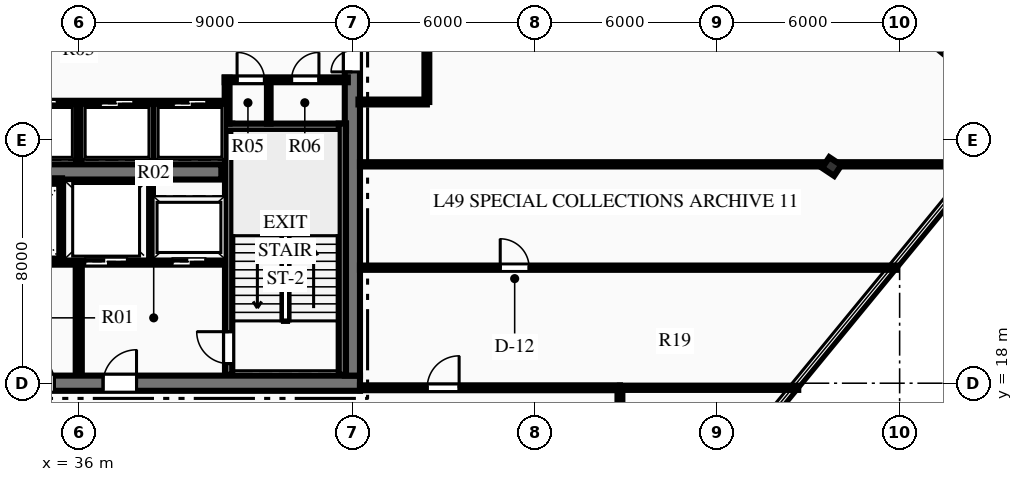
"""IFC4 building model, lengths in metres.
Left out: names, types, materials, properties, quantities, classifications, styles, units other than length and angle.
Written with IfcOpenShell. Run it as: python <this file> out.ifc"""

import sys

from ifc_helpers import new_model, si_unit, direction, frame, frame_2d, origin, origin_2d, place, context, subcontext, project, spatial, rectangle, i_section, extrude, element, fill, save


model = new_model("IFC4")
c1 = context("Model", 3, precision=1e-05, world=origin(), true_north=direction((0.0, 1.0)))
c2 = subcontext(c1, "Body", "Model", "MODEL_VIEW")
j1 = project(units=[si_unit("LENGTHUNIT", "METRE"), si_unit("PLANEANGLEUNIT", "RADIAN")], contexts=[c1])
p1 = place(None, origin())
s1 = spatial("IfcSite", under=j1, at=p1, CompositionType="ELEMENT")
p2 = place(p1, origin())
s2 = spatial("IfcBuilding", under=s1, at=p2, CompositionType="ELEMENT")
p3 = place(p2, frame((0.0, 0.0, 198.45)))
s3 = spatial("IfcBuildingStorey", under=s2, at=p3, CompositionType="ELEMENT", Elevation=198.45)
p4 = place(p3, frame((26.75, 18.0, 0.0), z_axis=(0.0, 0.0, 1.0), x_axis=(1.0, 0.0, 0.0)))
e1 = element("IfcWall", 1, at=p4, inside=s3, PredefinedType="SHEAR", context=c2, shape_type="SweptSolid", body=[
    extrude(rectangle(XDim=18.5, YDim=0.5, at=frame_2d((9.25, 0.0))), origin(), (0.0, 0.0, 1.0), 3.75),
])
p5 = place(p4, frame((7.35, 0.0, 0.0)))
e2 = element("IfcOpeningElement", 2, at=p5, cuts=e1, PredefinedType="OPENING", context=c2, shape_type="SweptSolid", body=[
    extrude(rectangle(XDim=1.1, YDim=2.15, at=frame_2d((0.55, 1.075))), frame((0.0, 0.26, 0.0), z_axis=(0.0, -1.0, 0.0), x_axis=(1.0, 0.0, 0.0)), (0.0, 0.0, 1.0), 0.52),
])
p6 = place(p4, frame((10.05, 0.0, 0.0)))
e3 = element("IfcOpeningElement", 3, at=p6, cuts=e1, PredefinedType="OPENING", context=c2, shape_type="SweptSolid", body=[
    extrude(rectangle(XDim=1.1, YDim=2.15, at=frame_2d((0.55, 1.075))), frame((0.0, 0.26, 0.0), z_axis=(0.0, -1.0, 0.0), x_axis=(1.0, 0.0, 0.0)), (0.0, 0.0, 1.0), 0.52),
])
p7 = place(p3, frame((45.0, 18.25, 0.0), z_axis=(0.0, 0.0, 1.0), x_axis=(0.0, 1.0, 0.0)))
e4 = element("IfcWall", 4, at=p7, inside=s3, PredefinedType="SHEAR", context=c2, shape_type="SweptSolid", body=[
    extrude(rectangle(XDim=15.5, YDim=0.5, at=frame_2d((7.75, 0.0))), origin(), (0.0, 0.0, 1.0), 3.75),
])
p8 = place(p7, frame((9.99, 0.0, 0.0)))
e5 = element("IfcOpeningElement", 5, at=p8, cuts=e4, PredefinedType="OPENING", context=c2, shape_type="SweptSolid", body=[
    extrude(rectangle(XDim=1.4, YDim=2.2, at=frame_2d((0.7, 1.1))), frame((0.0, 0.26, 0.0), z_axis=(0.0, -1.0, 0.0), x_axis=(1.0, 0.0, 0.0)), (0.0, 0.0, 1.0), 0.52),
])
p9 = place(p3, frame((31.31, 24.95, 0.0), z_axis=(0.0, 0.0, 1.0), x_axis=(1.0, 0.0, 0.0)))
e6 = element("IfcWall", 6, at=p9, inside=s3, PredefinedType="SHEAR", context=c2, shape_type="SweptSolid", body=[
    extrude(rectangle(XDim=9.38, YDim=0.5, at=frame_2d((4.69, 0.0))), origin(), (0.0, 0.0, 1.0), 3.75),
])
p10 = place(p3, frame((40.93, 18.28, 0.0), z_axis=(0.0, 0.0, 1.0), x_axis=(0.0, 1.0, 0.0)))
e7 = element("IfcWall", 7, at=p10, inside=s3, PredefinedType="SHEAR", context=c2, shape_type="SweptSolid", body=[
    extrude(rectangle(XDim=8.26, YDim=0.24, at=frame_2d((4.13, 0.0))), origin(), (0.0, 0.0, 1.0), 3.75),
])
p11 = place(p10, frame((0.365, 0.0, 0.0)))
e8 = element("IfcOpeningElement", 8, at=p11, cuts=e7, PredefinedType="OPENING", context=c2, shape_type="SweptSolid", body=[
    extrude(rectangle(XDim=1.05, YDim=2.15, at=frame_2d((0.525, 1.075))), frame((0.0, 0.13, 0.0), z_axis=(0.0, -1.0, 0.0), x_axis=(1.0, 0.0, 0.0)), (0.0, 0.0, 1.0), 0.26),
])
p12 = place(p3, frame((40.81, 26.42, 0.0), z_axis=(0.0, 0.0, 1.0), x_axis=(1.0, 0.0, 0.0)))
e9 = element("IfcWall", 9, at=p12, inside=s3, PredefinedType="SHEAR", context=c2, shape_type="SweptSolid", body=[
    extrude(rectangle(XDim=3.98, YDim=0.24, at=frame_2d((1.99, 0.0))), origin(), (0.0, 0.0, 1.0), 3.75),
])
p13 = place(p3, frame((44.67, 18.28, 0.0), z_axis=(0.0, 0.0, 1.0), x_axis=(0.0, 1.0, 0.0)))
e10 = element("IfcWall", 10, at=p13, inside=s3, PredefinedType="SHEAR", context=c2, shape_type="SweptSolid", body=[
    extrude(rectangle(XDim=8.26, YDim=0.24, at=frame_2d((4.13, 0.0))), origin(), (0.0, 0.0, 1.0), 3.75),
])
p14 = place(p3, frame((60.766, 25.126, 0.0), z_axis=(0.0, 0.0, 1.0), x_axis=(0.554118199338, 0.832437998389, 0.0)))
e11 = element("IfcColumn", 11, at=p14, inside=s3, PredefinedType="COLUMN", context=c2, shape_type="SweptSolid", body=[
    extrude(i_section(OverallWidth=0.424, OverallDepth=0.474, WebThickness=0.048, FlangeThickness=0.077, at=origin_2d()), origin(), (0.0, 0.0, 1.0), 3.75),
])
p15 = place(p3, frame((64.094, 29.323, 0.0), z_axis=(0.0, 0.0, 1.0), x_axis=(0.77274818591, -0.634712723343, 0.0)))
e12 = element("IfcWall", 12, at=p15, inside=s3, PredefinedType="STANDARD", context=c2, shape_type="SweptSolid", body=[
    extrude(rectangle(XDim=3.9, YDim=0.32, at=frame_2d((1.95, 0.0))), origin(), (0.0, 0.0, 1.0), 3.47),
])
p16 = place(p3, frame((36.0, 18.28, 0.0), z_axis=(0.0, 0.0, 1.0), x_axis=(0.0, 1.0, 0.0)))
e13 = element("IfcWall", 13, at=p16, inside=s3, PredefinedType="PARTITIONING", context=c2, shape_type="SweptSolid", body=[
    extrude(rectangle(XDim=3.77, YDim=0.2, at=frame_2d((1.885, 0.0))), origin(), (0.0, 0.0, 1.0), 3.47),
])
p17 = place(p3, frame((31.19, 22.0, 0.0), z_axis=(0.0, 0.0, 1.0), x_axis=(1.0, 0.0, 0.0)))
e14 = element("IfcWall", 14, at=p17, inside=s3, PredefinedType="PARTITIONING", context=c2, shape_type="SweptSolid", body=[
    extrude(rectangle(XDim=4.69, YDim=0.2, at=frame_2d((2.345, 0.0))), origin(), (0.0, 0.0, 1.0), 3.47),
])
p18 = place(p17, frame((2.91, 0.0, 0.0)))
e15 = element("IfcOpeningElement", 15, at=p18, cuts=e14, PredefinedType="OPENING", context=c2, shape_type="SweptSolid", body=[
    extrude(rectangle(XDim=0.9, YDim=2.15, at=frame_2d((0.45, 1.075))), frame((0.0, 0.11, 0.0), z_axis=(0.0, -1.0, 0.0), x_axis=(1.0, 0.0, 0.0)), (0.0, 0.0, 1.0), 0.22),
])
p19 = place(p17, frame((0.635, 0.0, 0.0)))
e16 = element("IfcOpeningElement", 16, at=p19, cuts=e14, PredefinedType="OPENING", context=c2, shape_type="SweptSolid", body=[
    extrude(rectangle(XDim=1.1, YDim=2.15, at=frame_2d((0.55, 1.075))), frame((0.0, 0.11, 0.0), z_axis=(0.0, -1.0, 0.0), x_axis=(1.0, 0.0, 0.0)), (0.0, 0.0, 1.0), 0.22),
])
p20 = place(p3, frame((36.12, 22.0, 0.0), z_axis=(0.0, 0.0, 1.0), x_axis=(1.0, 0.0, 0.0)))
e17 = element("IfcWall", 17, at=p20, inside=s3, PredefinedType="PARTITIONING", context=c2, shape_type="SweptSolid", body=[
    extrude(rectangle(XDim=4.69, YDim=0.2, at=frame_2d((2.345, 0.0))), origin(), (0.0, 0.0, 1.0), 3.47),
])
p21 = place(p20, frame((2.955, 0.0, 0.0)))
e18 = element("IfcOpeningElement", 18, at=p21, cuts=e17, PredefinedType="OPENING", context=c2, shape_type="SweptSolid", body=[
    extrude(rectangle(XDim=1.1, YDim=2.15, at=frame_2d((0.55, 1.075))), frame((0.0, 0.11, 0.0), z_axis=(0.0, -1.0, 0.0), x_axis=(1.0, 0.0, 0.0)), (0.0, 0.0, 1.0), 0.22),
])
p22 = place(p20, frame((0.08, 0.0, 0.0)))
e19 = element("IfcOpeningElement", 19, at=p22, cuts=e17, PredefinedType="OPENING", context=c2, shape_type="SweptSolid", body=[
    extrude(rectangle(XDim=1.4, YDim=2.2, at=frame_2d((0.7, 1.1))), frame((0.0, 0.11, 0.0), z_axis=(0.0, -1.0, 0.0), x_axis=(1.0, 0.0, 0.0)), (0.0, 0.0, 1.0), 0.22),
])
p23 = place(p3, frame((35.45, 22.05, 0.0), z_axis=(0.0, 0.0, 1.0), x_axis=(0.0, 1.0, 0.0)))
e20 = element("IfcWall", 20, at=p23, inside=s3, PredefinedType="PARTITIONING", context=c2, shape_type="SweptSolid", body=[
    extrude(rectangle(XDim=2.6, YDim=0.18, at=frame_2d((1.3, 0.0))), origin(), (0.0, 0.0, 1.0), 3.47),
])
p24 = place(p3, frame((33.65, 24.65, 0.0), z_axis=(0.0, 0.0, 1.0), x_axis=(1.0, 0.0, 0.0)))
e21 = element("IfcWall", 21, at=p24, inside=s3, PredefinedType="PARTITIONING", context=c2, shape_type="SweptSolid", body=[
    extrude(rectangle(XDim=1.8, YDim=0.18, at=frame_2d((0.9, 0.0))), origin(), (0.0, 0.0, 1.0), 3.47),
])
p25 = place(p3, frame((38.35, 22.05, 0.0), z_axis=(0.0, 0.0, 1.0), x_axis=(0.0, 1.0, 0.0)))
e22 = element("IfcWall", 22, at=p25, inside=s3, PredefinedType="PARTITIONING", context=c2, shape_type="SweptSolid", body=[
    extrude(rectangle(XDim=2.6, YDim=0.18, at=frame_2d((1.3, 0.0))), origin(), (0.0, 0.0, 1.0), 3.47),
])
p26 = place(p3, frame((40.8, 27.98, 0.0), z_axis=(0.0, 0.0, 1.0), x_axis=(1.0, 0.0, 0.0)))
e23 = element("IfcWall", 23, at=p26, inside=s3, PredefinedType="PARTITIONING", context=c2, shape_type="SweptSolid", body=[
    extrude(rectangle(XDim=4.05, YDim=0.16, at=frame_2d((2.025, 0.0))), origin(), (0.0, 0.0, 1.0), 3.47),
])
p27 = place(p26, frame((0.407, 0.0, 0.0)))
e24 = element("IfcOpeningElement", 24, at=p27, cuts=e23, PredefinedType="OPENING", context=c2, shape_type="SweptSolid", body=[
    extrude(rectangle(XDim=0.9, YDim=2.15, at=frame_2d((0.45, 1.075))), frame((0.0, 0.09, 0.0), z_axis=(0.0, -1.0, 0.0), x_axis=(1.0, 0.0, 0.0)), (0.0, 0.0, 1.0), 0.18),
])
p28 = place(p26, frame((2.2, 0.0, 0.0)))
e25 = element("IfcOpeningElement", 25, at=p28, cuts=e23, PredefinedType="OPENING", context=c2, shape_type="SweptSolid", body=[
    extrude(rectangle(XDim=0.9, YDim=2.15, at=frame_2d((0.45, 1.075))), frame((0.0, 0.09, 0.0), z_axis=(0.0, -1.0, 0.0), x_axis=(1.0, 0.0, 0.0)), (0.0, 0.0, 1.0), 0.18),
])
p29 = place(p3, frame((40.88, 26.54, 0.0), z_axis=(0.0, 0.0, 1.0), x_axis=(0.0, 1.0, 0.0)))
e26 = element("IfcWall", 26, at=p29, inside=s3, PredefinedType="PARTITIONING", context=c2, shape_type="SweptSolid", body=[
    extrude(rectangle(XDim=1.51, YDim=0.16, at=frame_2d((0.755, 0.0))), origin(), (0.0, 0.0, 1.0), 3.47),
])
p30 = place(p3, frame((42.25, 26.54, 0.0), z_axis=(0.0, 0.0, 1.0), x_axis=(0.0, 1.0, 0.0)))
e27 = element("IfcWall", 27, at=p30, inside=s3, PredefinedType="PARTITIONING", context=c2, shape_type="SweptSolid", body=[
    extrude(rectangle(XDim=1.44, YDim=0.12, at=frame_2d((0.72, 0.0))), origin(), (0.0, 0.0, 1.0), 3.47),
])
p31 = place(p3, frame((31.2, 27.2, 0.0), z_axis=(0.0, 0.0, 1.0), x_axis=(1.0, 0.0, 0.0)))
e28 = element("IfcWall", 28, at=p31, inside=s3, PredefinedType="PARTITIONING", context=c2, shape_type="SweptSolid", body=[
    extrude(rectangle(XDim=9.6, YDim=0.18, at=frame_2d((4.8, 0.0))), origin(), (0.0, 0.0, 1.0), 3.47),
])
p32 = place(p31, frame((0.59, 0.0, 0.0)))
e29 = element("IfcOpeningElement", 29, at=p32, cuts=e28, PredefinedType="OPENING", context=c2, shape_type="SweptSolid", body=[
    extrude(rectangle(XDim=1.1, YDim=2.15, at=frame_2d((0.55, 1.075))), frame((0.0, 0.1, 0.0), z_axis=(0.0, -1.0, 0.0), x_axis=(1.0, 0.0, 0.0)), (0.0, 0.0, 1.0), 0.2),
])
p33 = place(p31, frame((2.99, 0.0, 0.0)))
e30 = element("IfcOpeningElement", 30, at=p33, cuts=e28, PredefinedType="OPENING", context=c2, shape_type="SweptSolid", body=[
    extrude(rectangle(XDim=1.1, YDim=2.15, at=frame_2d((0.55, 1.075))), frame((0.0, 0.1, 0.0), z_axis=(0.0, -1.0, 0.0), x_axis=(1.0, 0.0, 0.0)), (0.0, 0.0, 1.0), 0.2),
])
p34 = place(p31, frame((5.51, 0.0, 0.0)))
e31 = element("IfcOpeningElement", 31, at=p34, cuts=e28, PredefinedType="OPENING", context=c2, shape_type="SweptSolid", body=[
    extrude(rectangle(XDim=1.1, YDim=2.15, at=frame_2d((0.55, 1.075))), frame((0.0, 0.1, 0.0), z_axis=(0.0, -1.0, 0.0), x_axis=(1.0, 0.0, 0.0)), (0.0, 0.0, 1.0), 0.2),
])
p35 = place(p31, frame((7.91, 0.0, 0.0)))
e32 = element("IfcOpeningElement", 32, at=p35, cuts=e28, PredefinedType="OPENING", context=c2, shape_type="SweptSolid", body=[
    extrude(rectangle(XDim=1.1, YDim=2.15, at=frame_2d((0.55, 1.075))), frame((0.0, 0.1, 0.0), z_axis=(0.0, -1.0, 0.0), x_axis=(1.0, 0.0, 0.0)), (0.0, 0.0, 1.0), 0.2),
])
for number, where, z_axis, x_axis in (
    (33, (36.0, 25.3, 0.0), (0.0, 0.0, 1.0), (0.0, 1.0, 0.0)),
    (34, (38.46, 25.3, 0.0), (0.0, 0.0, 1.0), (0.0, 1.0, 0.0)),
):
    element("IfcWall", number, at=place(p3, frame(where, z_axis=z_axis, x_axis=x_axis)), inside=s3, PredefinedType="PARTITIONING", context=c2, shape_type="SweptSolid", body=[
        extrude(rectangle(XDim=1.9, YDim=0.18, at=frame_2d((0.95, 0.0))), origin(), (0.0, 0.0, 1.0), 3.47),
    ])
p36 = place(p3, frame((45.25, 17.85, 0.0), z_axis=(0.0, 0.0, 1.0), x_axis=(1.0, 0.0, 0.0)))
e35 = element("IfcWall", 35, at=p36, inside=s3, PredefinedType="PARTITIONING", context=c2, shape_type="SweptSolid", body=[
    extrude(rectangle(XDim=8.55, YDim=0.16, at=frame_2d((4.275, 0.0))), origin(), (0.0, 0.0, 1.0), 3.47),
])
p37 = place(p36, frame((2.211, 0.0, 0.0)))
e36 = element("IfcOpeningElement", 36, at=p37, cuts=e35, PredefinedType="OPENING", context=c2, shape_type="SweptSolid", body=[
    extrude(rectangle(XDim=1.05, YDim=2.15, at=frame_2d((0.525, 1.075))), frame((0.0, 0.09, 0.0), z_axis=(0.0, -1.0, 0.0), x_axis=(1.0, 0.0, 0.0)), (0.0, 0.0, 1.0), 0.18),
])
p38 = place(p3, frame((47.45, 27.25, 0.0), z_axis=(0.0, 0.0, 1.0), x_axis=(0.0, 1.0, 0.0)))
e37 = element("IfcWall", 37, at=p38, inside=s3, PredefinedType="PARTITIONING", context=c2, shape_type="SweptSolid", body=[
    extrude(rectangle(XDim=6.9, YDim=0.16, at=frame_2d((3.45, 0.0))), origin(), (0.0, 0.0, 1.0), 3.47),
])
p39 = place(p38, frame((1.683, 0.0, 0.0)))
e38 = element("IfcOpeningElement", 38, at=p39, cuts=e37, PredefinedType="OPENING", context=c2, shape_type="SweptSolid", body=[
    extrude(rectangle(XDim=1.05, YDim=2.15, at=frame_2d((0.525, 1.075))), frame((0.0, 0.09, 0.0), z_axis=(0.0, -1.0, 0.0), x_axis=(1.0, 0.0, 0.0)), (0.0, 0.0, 1.0), 0.18),
])
p40 = place(p3, frame((45.2, 27.25, 0.0), z_axis=(0.0, 0.0, 1.0), x_axis=(1.0, 0.0, 0.0)))
e39 = element("IfcWall", 39, at=p40, inside=s3, PredefinedType="PARTITIONING", context=c2, shape_type="SweptSolid", body=[
    extrude(rectangle(XDim=2.25, YDim=0.16, at=frame_2d((1.125, 0.0))), origin(), (0.0, 0.0, 1.0), 3.47),
])
p41 = place(p3, frame((53.8, 15.55, 0.0), z_axis=(0.0, 0.0, 1.0), x_axis=(0.0, 1.0, 0.0)))
e40 = element("IfcWall", 40, at=p41, inside=s3, PredefinedType="PARTITIONING", context=c2, shape_type="SweptSolid", body=[
    extrude(rectangle(XDim=2.3, YDim=0.16, at=frame_2d((1.15, 0.0))), origin(), (0.0, 0.0, 1.0), 3.47),
])
p42 = place(p3, frame((53.8, 17.85, 0.0), z_axis=(0.0, 0.0, 1.0), x_axis=(1.0, 0.0, 0.0)))
e41 = element("IfcWall", 41, at=p42, inside=s3, PredefinedType="PARTITIONING", context=c2, shape_type="SweptSolid", body=[
    extrude(rectangle(XDim=5.865, YDim=0.14, at=frame_2d((2.933, 0.0))), origin(), (0.0, 0.0, 1.0), 3.47),
])
p43 = place(p3, frame((45.25, 21.8, 0.0), z_axis=(0.0, 0.0, 1.0), x_axis=(1.0, 0.0, 0.0)))
e42 = element("IfcWall", 42, at=p43, inside=s3, PredefinedType="PARTITIONING", context=c2, shape_type="SweptSolid", body=[
    extrude(rectangle(XDim=17.66, YDim=0.14, at=frame_2d((8.83, 0.0))), origin(), (0.0, 0.0, 1.0), 3.47),
])
p44 = place(p43, frame((4.613, 0.0, 0.0)))
e43 = element("IfcOpeningElement", 43, at=p44, cuts=e42, PredefinedType="OPENING", context=c2, shape_type="SweptSolid", body=[
    extrude(rectangle(XDim=0.95, YDim=2.15, at=frame_2d((0.475, 1.075))), frame((0.0, 0.08, 0.0), z_axis=(0.0, -1.0, 0.0), x_axis=(1.0, 0.0, 0.0)), (0.0, 0.0, 1.0), 0.16),
])
p45 = place(p3, frame((45.25, 25.2, 0.0), z_axis=(0.0, 0.0, 1.0), x_axis=(1.0, 0.0, 0.0)))
e44 = element("IfcWall", 44, at=p45, inside=s3, PredefinedType="PARTITIONING", context=c2, shape_type="SweptSolid", body=[
    extrude(rectangle(XDim=20.453, YDim=0.14, at=frame_2d((10.226, 0.0))), origin(), (0.0, 0.0, 1.0), 3.008),
])
p46 = place(p27, origin())
e45 = element("IfcDoor", 45, at=p46, inside=s3, OperationType="SINGLE_SWING_LEFT", PredefinedType="DOOR", context=c2, shape_type="SweptSolid", body=[
    extrude(rectangle(XDim=0.9, YDim=2.15, at=frame_2d((0.45, 1.075))), frame((0.0, 0.025, 0.0), z_axis=(0.0, -1.0, 0.0), x_axis=(1.0, 0.0, 0.0)), (0.0, 0.0, 1.0), 0.05),
])
fill(e24, e45)
p47 = place(p28, origin())
e46 = element("IfcDoor", 46, at=p47, inside=s3, OperationType="SINGLE_SWING_RIGHT", PredefinedType="DOOR", context=c2, shape_type="SweptSolid", body=[
    extrude(rectangle(XDim=0.9, YDim=2.15, at=frame_2d((0.45, 1.075))), frame((0.0, 0.025, 0.0), z_axis=(0.0, -1.0, 0.0), x_axis=(1.0, 0.0, 0.0)), (0.0, 0.0, 1.0), 0.05),
])
fill(e25, e46)
p48 = place(p11, origin())
e47 = element("IfcDoor", 47, at=p48, inside=s3, OperationType="SINGLE_SWING_RIGHT", PredefinedType="DOOR", context=c2, shape_type="SweptSolid", body=[
    extrude(rectangle(XDim=1.05, YDim=2.15, at=frame_2d((0.525, 1.075))), frame((0.0, 0.025, 0.0), z_axis=(0.0, -1.0, 0.0), x_axis=(1.0, 0.0, 0.0)), (0.0, 0.0, 1.0), 0.05),
])
fill(e8, e47)
p49 = place(p5, origin())
e48 = element("IfcDoor", 48, at=p49, inside=s3, OperationType="SINGLE_SWING_LEFT", PredefinedType="DOOR", context=c2, shape_type="SweptSolid", body=[
    extrude(rectangle(XDim=1.1, YDim=2.15, at=frame_2d((0.55, 1.075))), frame((0.0, 0.025, 0.0), z_axis=(0.0, -1.0, 0.0), x_axis=(1.0, 0.0, 0.0)), (0.0, 0.0, 1.0), 0.05),
])
fill(e2, e48)
p50 = place(p6, origin())
e49 = element("IfcDoor", 49, at=p50, inside=s3, OperationType="SINGLE_SWING_RIGHT", PredefinedType="DOOR", context=c2, shape_type="SweptSolid", body=[
    extrude(rectangle(XDim=1.1, YDim=2.15, at=frame_2d((0.55, 1.075))), frame((0.0, 0.025, 0.0), z_axis=(0.0, -1.0, 0.0), x_axis=(1.0, 0.0, 0.0)), (0.0, 0.0, 1.0), 0.05),
])
fill(e3, e49)
p51 = place(p8, origin())
e50 = element("IfcDoor", 50, at=p51, inside=s3, OperationType="DOUBLE_DOOR_SINGLE_SWING", PredefinedType="DOOR", context=c2, shape_type="SweptSolid", body=[
    extrude(rectangle(XDim=1.4, YDim=2.2, at=frame_2d((0.7, 1.1))), frame((0.0, 0.025, 0.0), z_axis=(0.0, -1.0, 0.0), x_axis=(1.0, 0.0, 0.0)), (0.0, 0.0, 1.0), 0.05),
])
fill(e5, e50)
p52 = place(p37, origin())
e51 = element("IfcDoor", 51, at=p52, inside=s3, OperationType="SINGLE_SWING_RIGHT", PredefinedType="DOOR", context=c2, shape_type="SweptSolid", body=[
    extrude(rectangle(XDim=1.05, YDim=2.15, at=frame_2d((0.525, 1.075))), frame((0.0, 0.025, 0.0), z_axis=(0.0, -1.0, 0.0), x_axis=(1.0, 0.0, 0.0)), (0.0, 0.0, 1.0), 0.05),
])
fill(e36, e51)
p53 = place(p44, origin())
e52 = element("IfcDoor", 52, at=p53, inside=s3, OperationType="SINGLE_SWING_LEFT", PredefinedType="DOOR", context=c2, shape_type="SweptSolid", body=[
    extrude(rectangle(XDim=0.95, YDim=2.15, at=frame_2d((0.475, 1.075))), frame((0.0, 0.025, 0.0), z_axis=(0.0, -1.0, 0.0), x_axis=(1.0, 0.0, 0.0)), (0.0, 0.0, 1.0), 0.05),
])
fill(e43, e52)
p54 = place(p33, origin())
e53 = element("IfcDoor", 53, at=p54, inside=s3, OperationType="SLIDING_TO_LEFT", PredefinedType="DOOR", context=c2, shape_type="SweptSolid", body=[
    extrude(rectangle(XDim=1.1, YDim=2.15, at=frame_2d((0.55, 1.075))), frame((0.0, 0.025, 0.0), z_axis=(0.0, -1.0, 0.0), x_axis=(1.0, 0.0, 0.0)), (0.0, 0.0, 1.0), 0.05),
])
fill(e30, e53)
p55 = place(p34, origin())
e54 = element("IfcDoor", 54, at=p55, inside=s3, OperationType="SLIDING_TO_LEFT", PredefinedType="DOOR", context=c2, shape_type="SweptSolid", body=[
    extrude(rectangle(XDim=1.1, YDim=2.15, at=frame_2d((0.55, 1.075))), frame((0.0, 0.025, 0.0), z_axis=(0.0, -1.0, 0.0), x_axis=(1.0, 0.0, 0.0)), (0.0, 0.0, 1.0), 0.05),
])
fill(e31, e54)
p56 = place(p35, origin())
e55 = element("IfcDoor", 55, at=p56, inside=s3, OperationType="SLIDING_TO_LEFT", PredefinedType="DOOR", context=c2, shape_type="SweptSolid", body=[
    extrude(rectangle(XDim=1.1, YDim=2.15, at=frame_2d((0.55, 1.075))), frame((0.0, 0.025, 0.0), z_axis=(0.0, -1.0, 0.0), x_axis=(1.0, 0.0, 0.0)), (0.0, 0.0, 1.0), 0.05),
])
fill(e32, e55)
p57 = place(p21, origin())
e56 = element("IfcDoor", 56, at=p57, inside=s3, OperationType="SLIDING_TO_LEFT", PredefinedType="DOOR", context=c2, shape_type="SweptSolid", body=[
    extrude(rectangle(XDim=1.1, YDim=2.15, at=frame_2d((0.55, 1.075))), frame((0.0, 0.025, 0.0), z_axis=(0.0, -1.0, 0.0), x_axis=(1.0, 0.0, 0.0)), (0.0, 0.0, 1.0), 0.05),
])
fill(e18, e56)
p58 = place(p22, origin())
e57 = element("IfcDoor", 57, at=p58, inside=s3, OperationType="SLIDING_TO_LEFT", PredefinedType="DOOR", context=c2, shape_type="SweptSolid", body=[
    extrude(rectangle(XDim=1.4, YDim=2.2, at=frame_2d((0.7, 1.1))), frame((0.0, 0.025, 0.0), z_axis=(0.0, -1.0, 0.0), x_axis=(1.0, 0.0, 0.0)), (0.0, 0.0, 1.0), 0.05),
])
fill(e19, e57)
save(model, sys.argv[1])
